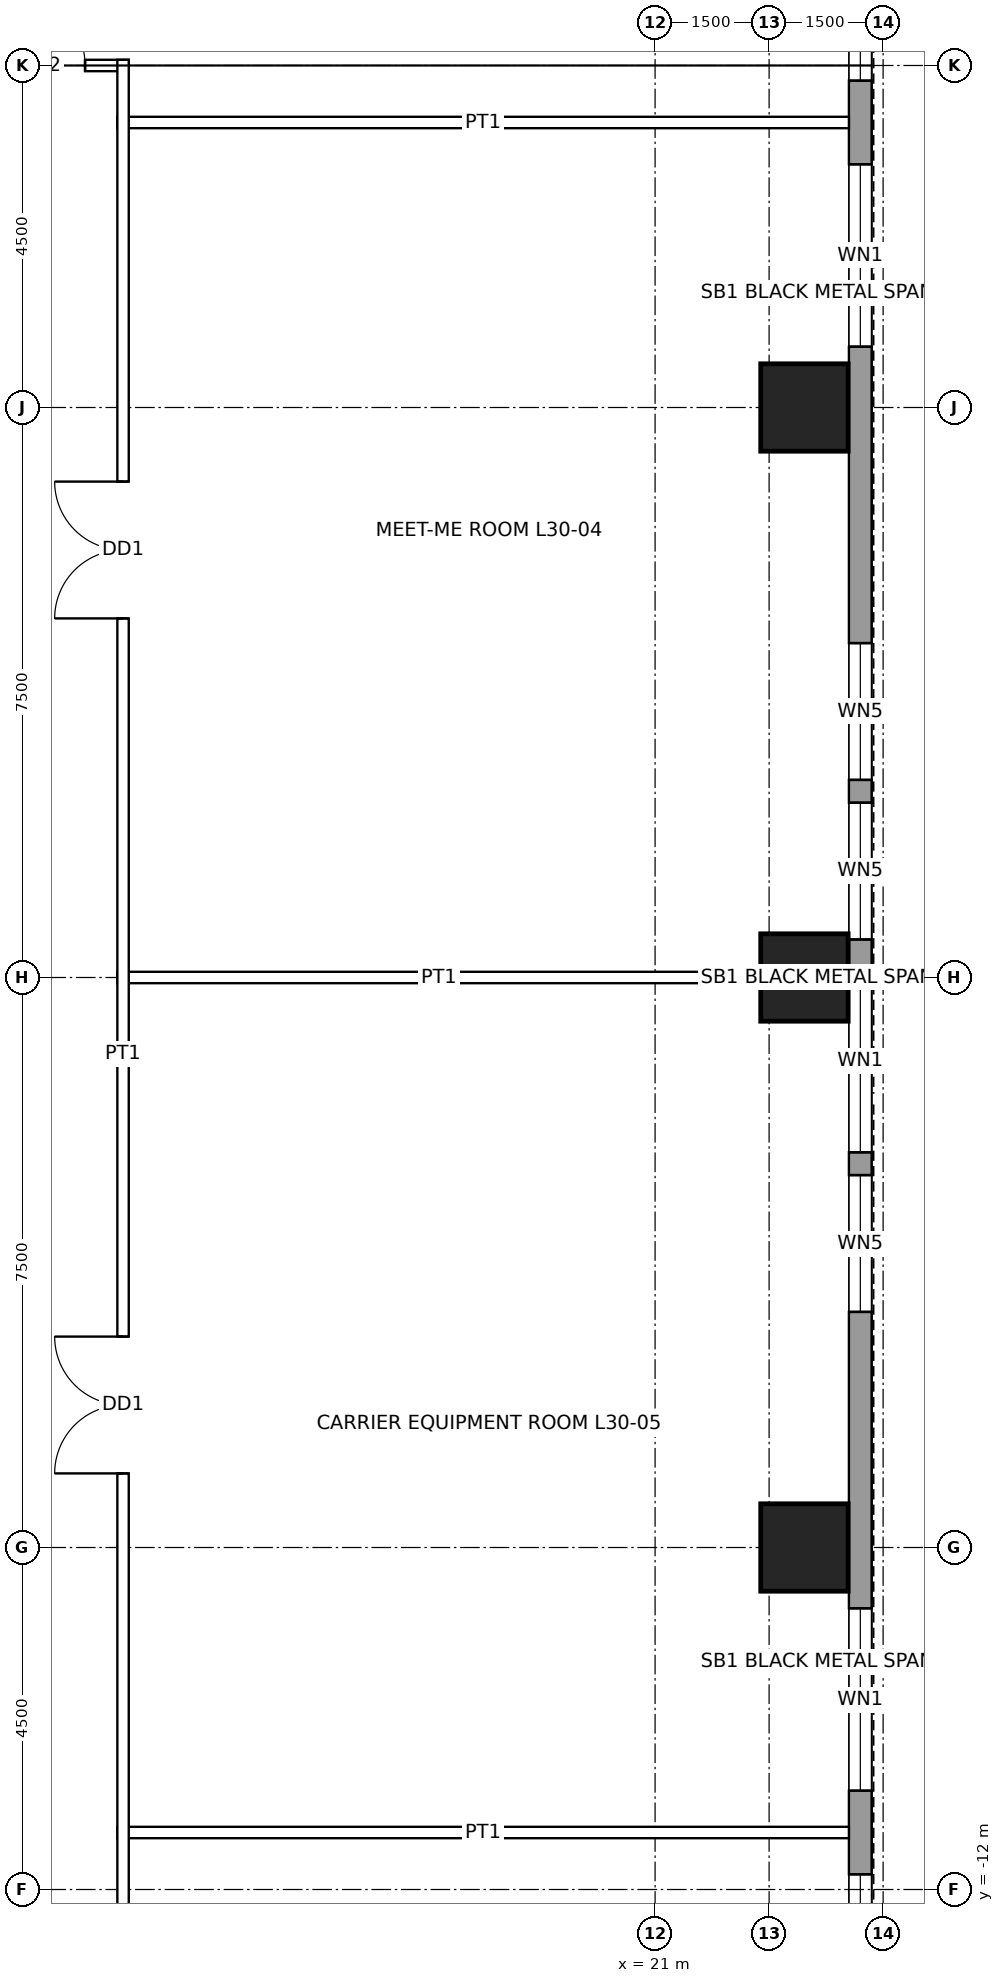
"""IFC4 building model, lengths in metres.
Left out: names, types, materials, properties, quantities, classifications, styles, units other than length and angle.
Written with IfcOpenShell. Run it as: python <this file> out.ifc"""

import sys

from ifc_helpers import new_model, si_unit, direction, frame, frame_2d, origin, origin_2d, place, context, subcontext, project, spatial, rectangle, hollow_rectangle, extrude, element, fill, save


model = new_model("IFC4")
c1 = context("Model", 3, precision=1e-05, world=origin(), true_north=direction((0.0, 1.0)))
c2 = subcontext(c1, "Body", "Model", "MODEL_VIEW")
j1 = project(units=[si_unit("LENGTHUNIT", "METRE"), si_unit("PLANEANGLEUNIT", "RADIAN")], contexts=[c1])
p1 = place(None, origin())
s1 = spatial("IfcSite", under=j1, at=p1, CompositionType="ELEMENT")
p2 = place(p1, origin())
s2 = spatial("IfcBuilding", under=s1, at=p2, CompositionType="ELEMENT")
p3 = place(p2, frame((0.0, 0.0, 149.4)))
s3 = spatial("IfcBuildingStorey", under=s2, at=p3, CompositionType="ELEMENT", Elevation=149.4)
for number, where, z_axis, x_axis in (
    (1, (22.965, 7.5, 0.0), (0.0, 0.0, 1.0), (1.0, 0.0, 0.0)),
    (2, (22.965, 0.0, 0.0), (0.0, 0.0, 1.0), (1.0, 0.0, 0.0)),
    (3, (22.965, -7.5, 0.0), (0.0, 0.0, 1.0), (1.0, 0.0, 0.0)),
):
    element("IfcColumn", number, at=place(p3, frame(where, z_axis=z_axis, x_axis=x_axis)), inside=s3, PredefinedType="COLUMN", context=c2, shape_type="SweptSolid", body=[
        extrude(hollow_rectangle(XDim=1.15, YDim=1.15, WallThickness=0.075, at=origin_2d()), origin(), (0.0, 0.0, 1.0), 4.5),
    ])
p4 = place(p3, frame((23.7, 16.2, 0.0), z_axis=(0.0, 0.0, 1.0), x_axis=(0.0, -1.0, 0.0)))
e4 = element("IfcWall", 4, at=p4, inside=s3, PredefinedType="SOLIDWALL", context=c2, shape_type="SweptSolid", body=[
    extrude(rectangle(XDim=32.4, YDim=0.3, at=frame_2d((16.2, 0.0))), origin(), (0.0, 0.0, 1.0), 4.3),
])
p5 = place(p4, frame((2.0, 0.0, 1.0)))
e5 = element("IfcOpeningElement", 5, at=p5, cuts=e4, PredefinedType="OPENING", context=c2, shape_type="SweptSolid", body=[
    extrude(rectangle(XDim=2.4, YDim=1.2, at=frame_2d((1.2, 0.6))), frame((0.0, 0.16, 0.0), z_axis=(0.0, -1.0, 0.0), x_axis=(1.0, 0.0, 0.0)), (0.0, 0.0, 1.0), 0.32),
])
p6 = place(p4, frame((5.5, 0.0, 1.0)))
e6 = element("IfcOpeningElement", 6, at=p6, cuts=e4, PredefinedType="OPENING", context=c2, shape_type="SweptSolid", body=[
    extrude(rectangle(XDim=2.4, YDim=1.2, at=frame_2d((1.2, 0.6))), frame((0.0, 0.16, 0.0), z_axis=(0.0, -1.0, 0.0), x_axis=(1.0, 0.0, 0.0)), (0.0, 0.0, 1.0), 0.32),
])
p7 = place(p4, frame((11.8, 0.0, 1.0)))
e7 = element("IfcOpeningElement", 7, at=p7, cuts=e4, PredefinedType="OPENING", context=c2, shape_type="SweptSolid", body=[
    extrude(rectangle(XDim=1.8, YDim=1.2, at=frame_2d((0.9, 0.6))), frame((0.0, 0.16, 0.0), z_axis=(0.0, -1.0, 0.0), x_axis=(1.0, 0.0, 0.0)), (0.0, 0.0, 1.0), 0.32),
])
p8 = place(p4, frame((13.9, 0.0, 1.0)))
e8 = element("IfcOpeningElement", 8, at=p8, cuts=e4, PredefinedType="OPENING", context=c2, shape_type="SweptSolid", body=[
    extrude(rectangle(XDim=1.8, YDim=1.2, at=frame_2d((0.9, 0.6))), frame((0.0, 0.16, 0.0), z_axis=(0.0, -1.0, 0.0), x_axis=(1.0, 0.0, 0.0)), (0.0, 0.0, 1.0), 0.32),
])
p9 = place(p4, frame((16.1, 0.0, 1.0)))
e9 = element("IfcOpeningElement", 9, at=p9, cuts=e4, PredefinedType="OPENING", context=c2, shape_type="SweptSolid", body=[
    extrude(rectangle(XDim=2.4, YDim=1.2, at=frame_2d((1.2, 0.6))), frame((0.0, 0.16, 0.0), z_axis=(0.0, -1.0, 0.0), x_axis=(1.0, 0.0, 0.0)), (0.0, 0.0, 1.0), 0.32),
])
p10 = place(p4, frame((18.8, 0.0, 1.0)))
e10 = element("IfcOpeningElement", 10, at=p10, cuts=e4, PredefinedType="OPENING", context=c2, shape_type="SweptSolid", body=[
    extrude(rectangle(XDim=1.8, YDim=1.2, at=frame_2d((0.9, 0.6))), frame((0.0, 0.16, 0.0), z_axis=(0.0, -1.0, 0.0), x_axis=(1.0, 0.0, 0.0)), (0.0, 0.0, 1.0), 0.32),
])
p11 = place(p4, frame((24.5, 0.0, 1.0)))
e11 = element("IfcOpeningElement", 11, at=p11, cuts=e4, PredefinedType="OPENING", context=c2, shape_type="SweptSolid", body=[
    extrude(rectangle(XDim=2.4, YDim=1.2, at=frame_2d((1.2, 0.6))), frame((0.0, 0.16, 0.0), z_axis=(0.0, -1.0, 0.0), x_axis=(1.0, 0.0, 0.0)), (0.0, 0.0, 1.0), 0.32),
])
p12 = place(p4, frame((28.0, 0.0, 1.0)))
e12 = element("IfcOpeningElement", 12, at=p12, cuts=e4, PredefinedType="OPENING", context=c2, shape_type="SweptSolid", body=[
    extrude(rectangle(XDim=2.4, YDim=1.2, at=frame_2d((1.2, 0.6))), frame((0.0, 0.16, 0.0), z_axis=(0.0, -1.0, 0.0), x_axis=(1.0, 0.0, 0.0)), (0.0, 0.0, 1.0), 0.32),
])
p13 = place(p3, frame((13.925, -11.25, 0.0), z_axis=(0.0, 0.0, 1.0), x_axis=(1.0, 0.0, 0.0)))
e13 = element("IfcWall", 13, at=p13, inside=s3, PredefinedType="PARTITIONING", context=c2, shape_type="SweptSolid", body=[
    extrude(rectangle(XDim=9.625, YDim=0.15, at=frame_2d((4.812, 0.0))), origin(), (0.0, 0.0, 1.0), 3.431),
])
p14 = place(p3, frame((13.925, 0.0, 0.0), z_axis=(0.0, 0.0, 1.0), x_axis=(1.0, 0.0, 0.0)))
e14 = element("IfcWall", 14, at=p14, inside=s3, PredefinedType="PARTITIONING", context=c2, shape_type="SweptSolid", body=[
    extrude(rectangle(XDim=8.465, YDim=0.15, at=frame_2d((4.232, 0.0))), origin(), (0.0, 0.0, 1.0), 3.431),
])
p15 = place(p3, frame((13.925, 11.25, 0.0), z_axis=(0.0, 0.0, 1.0), x_axis=(1.0, 0.0, 0.0)))
e15 = element("IfcWall", 15, at=p15, inside=s3, PredefinedType="PARTITIONING", context=c2, shape_type="SweptSolid", body=[
    extrude(rectangle(XDim=9.625, YDim=0.15, at=frame_2d((4.812, 0.0))), origin(), (0.0, 0.0, 1.0), 3.431),
])
p16 = place(p3, frame((12.0, 12.0, 0.0), z_axis=(0.0, 0.0, 1.0), x_axis=(1.0, 0.0, 0.0)))
e16 = element("IfcWall", 16, at=p16, inside=s3, PredefinedType="PARTITIONING", context=c2, shape_type="SweptSolid", body=[
    extrude(rectangle(XDim=2.075, YDim=0.15, at=frame_2d((1.038, 0.0))), origin(), (0.0, 0.0, 1.0), 3.284),
])
p17 = place(p16, frame((0.5, 0.0, 0.0)))
e17 = element("IfcOpeningElement", 17, at=p17, cuts=e16, PredefinedType="OPENING", context=c2, shape_type="SweptSolid", body=[
    extrude(rectangle(XDim=1.0, YDim=2.1, at=frame_2d((0.5, 1.05))), frame((0.0, 0.085, 0.0), z_axis=(0.0, -1.0, 0.0), x_axis=(1.0, 0.0, 0.0)), (0.0, 0.0, 1.0), 0.17),
])
p18 = place(p3, frame((14.0, -14.075, 0.0), z_axis=(0.0, 0.0, 1.0), x_axis=(0.0, 1.0, 0.0)))
e18 = element("IfcWall", 18, at=p18, inside=s3, PredefinedType="PARTITIONING", context=c2, shape_type="SweptSolid", body=[
    extrude(rectangle(XDim=26.15, YDim=0.15, at=frame_2d((13.075, 0.0))), origin(), (0.0, 0.0, 1.0), 4.3),
])
p19 = place(p18, frame((18.8, 0.0, 0.0)))
e19 = element("IfcOpeningElement", 19, at=p19, cuts=e18, PredefinedType="OPENING", context=c2, shape_type="SweptSolid", body=[
    extrude(rectangle(XDim=1.8, YDim=2.4, at=frame_2d((0.9, 1.2))), frame((0.0, 0.085, 0.0), z_axis=(0.0, -1.0, 0.0), x_axis=(1.0, 0.0, 0.0)), (0.0, 0.0, 1.0), 0.17),
])
p20 = place(p18, frame((7.55, 0.0, 0.0)))
e20 = element("IfcOpeningElement", 20, at=p20, cuts=e18, PredefinedType="OPENING", context=c2, shape_type="SweptSolid", body=[
    extrude(rectangle(XDim=1.8, YDim=2.4, at=frame_2d((0.9, 1.2))), frame((0.0, 0.085, 0.0), z_axis=(0.0, -1.0, 0.0), x_axis=(1.0, 0.0, 0.0)), (0.0, 0.0, 1.0), 0.17),
])
p21 = place(p5, origin())
e21 = element("IfcWindow", 21, at=p21, inside=s3, PartitioningType="SINGLE_PANEL", PredefinedType="WINDOW", context=c2, shape_type="SweptSolid", body=[
    extrude(rectangle(XDim=2.4, YDim=1.2, at=frame_2d((1.2, 0.6))), frame((0.0, 0.03, 0.0), z_axis=(0.0, -1.0, 0.0), x_axis=(1.0, 0.0, 0.0)), (0.0, 0.0, 1.0), 0.06),
])
fill(e5, e21)
p22 = place(p6, origin())
e22 = element("IfcWindow", 22, at=p22, inside=s3, PartitioningType="SINGLE_PANEL", PredefinedType="WINDOW", context=c2, shape_type="SweptSolid", body=[
    extrude(rectangle(XDim=2.4, YDim=1.2, at=frame_2d((1.2, 0.6))), frame((0.0, 0.03, 0.0), z_axis=(0.0, -1.0, 0.0), x_axis=(1.0, 0.0, 0.0)), (0.0, 0.0, 1.0), 0.06),
])
fill(e6, e22)
p23 = place(p7, origin())
e23 = element("IfcWindow", 23, at=p23, inside=s3, PartitioningType="SINGLE_PANEL", PredefinedType="WINDOW", context=c2, shape_type="SweptSolid", body=[
    extrude(rectangle(XDim=1.8, YDim=1.2, at=frame_2d((0.9, 0.6))), frame((0.0, 0.03, 0.0), z_axis=(0.0, -1.0, 0.0), x_axis=(1.0, 0.0, 0.0)), (0.0, 0.0, 1.0), 0.06),
])
fill(e7, e23)
p24 = place(p8, origin())
e24 = element("IfcWindow", 24, at=p24, inside=s3, PartitioningType="SINGLE_PANEL", PredefinedType="WINDOW", context=c2, shape_type="SweptSolid", body=[
    extrude(rectangle(XDim=1.8, YDim=1.2, at=frame_2d((0.9, 0.6))), frame((0.0, 0.03, 0.0), z_axis=(0.0, -1.0, 0.0), x_axis=(1.0, 0.0, 0.0)), (0.0, 0.0, 1.0), 0.06),
])
fill(e8, e24)
p25 = place(p9, origin())
e25 = element("IfcWindow", 25, at=p25, inside=s3, PartitioningType="SINGLE_PANEL", PredefinedType="WINDOW", context=c2, shape_type="SweptSolid", body=[
    extrude(rectangle(XDim=2.4, YDim=1.2, at=frame_2d((1.2, 0.6))), frame((0.0, 0.03, 0.0), z_axis=(0.0, -1.0, 0.0), x_axis=(1.0, 0.0, 0.0)), (0.0, 0.0, 1.0), 0.06),
])
fill(e9, e25)
p26 = place(p10, origin())
e26 = element("IfcWindow", 26, at=p26, inside=s3, PartitioningType="SINGLE_PANEL", PredefinedType="WINDOW", context=c2, shape_type="SweptSolid", body=[
    extrude(rectangle(XDim=1.8, YDim=1.2, at=frame_2d((0.9, 0.6))), frame((0.0, 0.03, 0.0), z_axis=(0.0, -1.0, 0.0), x_axis=(1.0, 0.0, 0.0)), (0.0, 0.0, 1.0), 0.06),
])
fill(e10, e26)
p27 = place(p11, origin())
e27 = element("IfcWindow", 27, at=p27, inside=s3, PartitioningType="SINGLE_PANEL", PredefinedType="WINDOW", context=c2, shape_type="SweptSolid", body=[
    extrude(rectangle(XDim=2.4, YDim=1.2, at=frame_2d((1.2, 0.6))), frame((0.0, 0.03, 0.0), z_axis=(0.0, -1.0, 0.0), x_axis=(1.0, 0.0, 0.0)), (0.0, 0.0, 1.0), 0.06),
])
fill(e11, e27)
p28 = place(p12, origin())
e28 = element("IfcWindow", 28, at=p28, inside=s3, PartitioningType="SINGLE_PANEL", PredefinedType="WINDOW", context=c2, shape_type="SweptSolid", body=[
    extrude(rectangle(XDim=2.4, YDim=1.2, at=frame_2d((1.2, 0.6))), frame((0.0, 0.03, 0.0), z_axis=(0.0, -1.0, 0.0), x_axis=(1.0, 0.0, 0.0)), (0.0, 0.0, 1.0), 0.06),
])
fill(e12, e28)
p29 = place(p19, origin())
e29 = element("IfcDoor", 29, at=p29, inside=s3, OperationType="DOUBLE_DOOR_SINGLE_SWING", PredefinedType="DOOR", context=c2, shape_type="SweptSolid", body=[
    extrude(rectangle(XDim=1.8, YDim=2.4, at=frame_2d((0.9, 1.2))), frame((0.0, 0.025, 0.0), z_axis=(0.0, -1.0, 0.0), x_axis=(1.0, 0.0, 0.0)), (0.0, 0.0, 1.0), 0.05),
])
fill(e19, e29)
p30 = place(p20, origin())
e30 = element("IfcDoor", 30, at=p30, inside=s3, OperationType="DOUBLE_DOOR_SINGLE_SWING", PredefinedType="DOOR", context=c2, shape_type="SweptSolid", body=[
    extrude(rectangle(XDim=1.8, YDim=2.4, at=frame_2d((0.9, 1.2))), frame((0.0, 0.025, 0.0), z_axis=(0.0, -1.0, 0.0), x_axis=(1.0, 0.0, 0.0)), (0.0, 0.0, 1.0), 0.05),
])
fill(e20, e30)
p31 = place(p17, origin())
e31 = element("IfcDoor", 31, at=p31, inside=s3, OperationType="SINGLE_SWING_LEFT", PredefinedType="DOOR", context=c2, shape_type="SweptSolid", body=[
    extrude(rectangle(XDim=1.0, YDim=2.1, at=frame_2d((0.5, 1.05))), frame((0.0, 0.025, 0.0), z_axis=(0.0, -1.0, 0.0), x_axis=(1.0, 0.0, 0.0)), (0.0, 0.0, 1.0), 0.05),
])
fill(e17, e31)
save(model, sys.argv[1])
